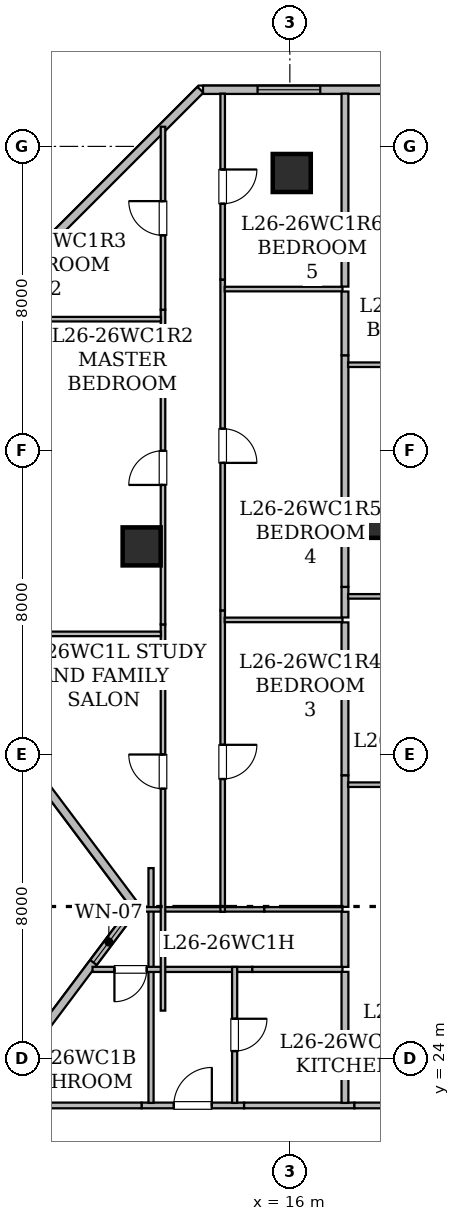
"""IFC4 building model, lengths in metres.
Left out: names, types, materials, properties, quantities, classifications, styles, units other than length and angle.
Written with IfcOpenShell. Run it as: python <this file> out.ifc"""

import sys

from ifc_helpers import new_model, si_unit, direction, frame, frame_2d, origin, origin_2d, place, context, subcontext, project, spatial, rectangle, hollow_rectangle, extrude, element, fill, save


model = new_model("IFC4")
c1 = context("Model", 3, precision=1e-05, world=origin(), true_north=direction((0.0, 1.0)))
c2 = subcontext(c1, "Body", "Model", "MODEL_VIEW")
j1 = project(units=[si_unit("LENGTHUNIT", "METRE"), si_unit("PLANEANGLEUNIT", "RADIAN")], contexts=[c1])
p1 = place(None, origin())
s1 = spatial("IfcSite", under=j1, at=p1, CompositionType="ELEMENT")
p2 = place(p1, origin())
s2 = spatial("IfcBuilding", under=s1, at=p2, CompositionType="ELEMENT")
p3 = place(p2, frame((0.0, 0.0, 105.55)))
s3 = spatial("IfcBuildingStorey", under=s2, at=p3, CompositionType="ELEMENT", Elevation=105.55)
for number, where, z_axis, x_axis in (
    (1, (16.05, 47.3, 0.0), (0.0, 0.0, 1.0), (1.0, 0.0, 0.0)),
    (2, (12.1, 37.475, 0.0), (0.0, 0.0, 1.0), (1.0, 0.0, 0.0)),
    (3, (18.0, 38.2, 0.0), (0.0, 0.0, 1.0), (1.0, 0.0, 0.0)),
):
    element("IfcColumn", number, at=place(p3, frame(where, z_axis=z_axis, x_axis=x_axis)), inside=s3, PredefinedType="COLUMN", context=c2, shape_type="SweptSolid", body=[
        extrude(hollow_rectangle(XDim=1.0, YDim=1.0, WallThickness=0.05, at=origin_2d()), origin(), (0.0, 0.0, 1.0), 3.65),
    ])
p4 = place(p3, frame((9.544, 24.808, 0.0), z_axis=(0.0, 0.0, 1.0), x_axis=(0.600019580308, 0.799985314394, 0.0)))
e4 = element("IfcWall", 4, at=p4, inside=s3, PredefinedType="STANDARD", context=c2, shape_type="SweptSolid", body=[
    extrude(rectangle(XDim=3.99, YDim=0.22, at=frame_2d((1.995, 0.0))), origin(), (0.0, 0.0, 1.0), 3.43),
])
p5 = place(p4, frame((2.147, 0.0, 0.85)))
e5 = element("IfcOpeningElement", 5, at=p5, cuts=e4, PredefinedType="OPENING", context=c2, shape_type="SweptSolid", body=[
    extrude(rectangle(XDim=1.35, YDim=1.5, at=frame_2d((0.675, 0.75))), frame((0.0, 0.12, 0.0), z_axis=(0.0, -1.0, 0.0), x_axis=(1.0, 0.0, 0.0)), (0.0, 0.0, 1.0), 0.24),
])
p6 = place(p3, frame((11.881, 28.077, 0.0), z_axis=(0.0, 0.0, 1.0), x_axis=(-0.600158184825, 0.799881336942, 0.0)))
e6 = element("IfcWall", 6, at=p6, inside=s3, PredefinedType="STANDARD", context=c2, shape_type="SweptSolid", body=[
    extrude(rectangle(XDim=3.951, YDim=0.22, at=frame_2d((1.975, 0.0))), origin(), (0.0, 0.0, 1.0), 3.43),
])
p7 = place(p3, frame((9.558, 45.402, 0.0), z_axis=(0.0, 0.0, 1.0), x_axis=(0.707106781187, 0.707106781187, 0.0)))
e7 = element("IfcWall", 7, at=p7, inside=s3, PredefinedType="STANDARD", context=c2, shape_type="SweptSolid", body=[
    extrude(rectangle(XDim=5.781, YDim=0.22, at=frame_2d((2.891, 0.0))), origin(), (0.0, 0.0, 1.0), 3.43),
])
p8 = place(p3, frame((13.715, 49.49, 0.0), z_axis=(0.0, 0.0, 1.0), x_axis=(1.0, 0.0, 0.0)))
e8 = element("IfcWall", 8, at=p8, inside=s3, PredefinedType="STANDARD", context=c2, shape_type="SweptSolid", body=[
    extrude(rectangle(XDim=38.639, YDim=0.22, at=frame_2d((19.319, 0.0))), origin(), (0.0, 0.0, 1.0), 3.43),
])
p9 = place(p8, frame((1.435, 0.0, 0.85)))
e9 = element("IfcOpeningElement", 9, at=p9, cuts=e8, PredefinedType="OPENING", context=c2, shape_type="SweptSolid", body=[
    extrude(rectangle(XDim=1.65, YDim=1.55, at=frame_2d((0.825, 0.775))), frame((0.0, 0.12, 0.0), z_axis=(0.0, -1.0, 0.0), x_axis=(1.0, 0.0, 0.0)), (0.0, 0.0, 1.0), 0.24),
])
p10 = place(p8, frame((10.802, 0.0, 0.85)))
e10 = element("IfcOpeningElement", 10, at=p10, cuts=e8, PredefinedType="OPENING", context=c2, shape_type="SweptSolid", body=[
    extrude(rectangle(XDim=1.65, YDim=1.55, at=frame_2d((0.825, 0.775))), frame((0.0, 0.12, 0.0), z_axis=(0.0, -1.0, 0.0), x_axis=(1.0, 0.0, 0.0)), (0.0, 0.0, 1.0), 0.24),
])
p11 = place(p8, frame((8.744, 0.0, 0.8)))
e11 = element("IfcOpeningElement", 11, at=p11, cuts=e8, PredefinedType="OPENING", context=c2, shape_type="SweptSolid", body=[
    extrude(rectangle(XDim=1.2, YDim=1.5, at=frame_2d((0.6, 0.75))), frame((0.0, 0.12, 0.0), z_axis=(0.0, -1.0, 0.0), x_axis=(1.0, 0.0, 0.0)), (0.0, 0.0, 1.0), 0.24),
])
p12 = place(p8, frame((5.319, 0.0, 0.85)))
e12 = element("IfcOpeningElement", 12, at=p12, cuts=e8, PredefinedType="OPENING", context=c2, shape_type="SweptSolid", body=[
    extrude(rectangle(XDim=1.65, YDim=1.55, at=frame_2d((0.825, 0.775))), frame((0.0, 0.12, 0.0), z_axis=(0.0, -1.0, 0.0), x_axis=(1.0, 0.0, 0.0)), (0.0, 0.0, 1.0), 0.24),
])
p13 = place(p8, frame((15.665, 0.0, 0.85)))
e13 = element("IfcOpeningElement", 13, at=p13, cuts=e8, PredefinedType="OPENING", context=c2, shape_type="SweptSolid", body=[
    extrude(rectangle(XDim=1.65, YDim=1.55, at=frame_2d((0.825, 0.775))), frame((0.0, 0.12, 0.0), z_axis=(0.0, -1.0, 0.0), x_axis=(1.0, 0.0, 0.0)), (0.0, 0.0, 1.0), 0.24),
])
p14 = place(p8, frame((22.93, 0.0, 0.85)))
e14 = element("IfcOpeningElement", 14, at=p14, cuts=e8, PredefinedType="OPENING", context=c2, shape_type="SweptSolid", body=[
    extrude(rectangle(XDim=1.65, YDim=1.55, at=frame_2d((0.825, 0.775))), frame((0.0, 0.12, 0.0), z_axis=(0.0, -1.0, 0.0), x_axis=(1.0, 0.0, 0.0)), (0.0, 0.0, 1.0), 0.24),
])
p15 = place(p8, frame((30.23, 0.0, 0.85)))
e15 = element("IfcOpeningElement", 15, at=p15, cuts=e8, PredefinedType="OPENING", context=c2, shape_type="SweptSolid", body=[
    extrude(rectangle(XDim=1.65, YDim=1.55, at=frame_2d((0.825, 0.775))), frame((0.0, 0.12, 0.0), z_axis=(0.0, -1.0, 0.0), x_axis=(1.0, 0.0, 0.0)), (0.0, 0.0, 1.0), 0.24),
])
p16 = place(p8, frame((36.367, 0.0, 0.85)))
e16 = element("IfcOpeningElement", 16, at=p16, cuts=e8, PredefinedType="OPENING", context=c2, shape_type="SweptSolid", body=[
    extrude(rectangle(XDim=1.65, YDim=1.55, at=frame_2d((0.825, 0.775))), frame((0.0, 0.12, 0.0), z_axis=(0.0, -1.0, 0.0), x_axis=(1.0, 0.0, 0.0)), (0.0, 0.0, 1.0), 0.24),
])
p17 = place(p3, frame((12.098, 22.765, 0.0), z_axis=(0.0, 0.0, 1.0), x_axis=(1.0, 0.0, 0.0)))
e17 = element("IfcWall", 17, at=p17, inside=s3, PredefinedType="STANDARD", context=c2, shape_type="SweptSolid", body=[
    extrude(rectangle(XDim=2.698, YDim=0.15, at=frame_2d((1.349, 0.0))), origin(), (0.0, 0.0, 1.0), 2.876),
])
p18 = place(p17, frame((0.849, 0.0, 0.0)))
e18 = element("IfcOpeningElement", 18, at=p18, cuts=e17, PredefinedType="OPENING", context=c2, shape_type="SweptSolid", body=[
    extrude(rectangle(XDim=1.0, YDim=2.15, at=frame_2d((0.5, 1.075))), frame((0.0, 0.085, 0.0), z_axis=(0.0, -1.0, 0.0), x_axis=(1.0, 0.0, 0.0)), (0.0, 0.0, 1.0), 0.17),
])
p19 = place(p3, frame((9.612, 22.765, 0.0), z_axis=(0.0, 0.0, 1.0), x_axis=(1.0, 0.0, 0.0)))
e19 = element("IfcWall", 19, at=p19, inside=s3, PredefinedType="STANDARD", context=c2, shape_type="SweptSolid", body=[
    extrude(rectangle(XDim=2.486, YDim=0.15, at=frame_2d((1.243, 0.0))), origin(), (0.0, 0.0, 1.0), 2.876),
])
p20 = place(p3, frame((14.796, 22.765, 0.0), z_axis=(0.0, 0.0, 1.0), x_axis=(1.0, 0.0, 0.0)))
e20 = element("IfcWall", 20, at=p20, inside=s3, PredefinedType="STANDARD", context=c2, shape_type="SweptSolid", body=[
    extrude(rectangle(XDim=2.903, YDim=0.15, at=frame_2d((1.452, 0.0))), origin(), (0.0, 0.0, 1.0), 3.43),
])
p21 = place(p3, frame((17.699, 22.765, 0.0), z_axis=(0.0, 0.0, 1.0), x_axis=(1.0, 0.0, 0.0)))
e21 = element("IfcWall", 21, at=p21, inside=s3, PredefinedType="STANDARD", context=c2, shape_type="SweptSolid", body=[
    extrude(rectangle(XDim=4.321, YDim=0.15, at=frame_2d((2.161, 0.0))), origin(), (0.0, 0.0, 1.0), 2.647),
])
p22 = place(p3, frame((12.347, 22.832, 0.0), z_axis=(0.0, 0.0, 1.0), x_axis=(0.0, 1.0, 0.0)))
e22 = element("IfcWall", 22, at=p22, inside=s3, PredefinedType="PARTITIONING", context=c2, shape_type="SweptSolid", body=[
    extrude(rectangle(XDim=6.178, YDim=0.135, at=frame_2d((3.089, 0.0))), origin(), (0.0, 0.0, 1.0), 2.876),
])
p23 = place(p3, frame((15.012, 26.345, 0.0), z_axis=(0.0, 0.0, 1.0), x_axis=(-1.0, 0.0, 0.0)))
e23 = element("IfcWall", 23, at=p23, inside=s3, PredefinedType="PARTITIONING", context=c2, shape_type="SweptSolid", body=[
    extrude(rectangle(XDim=4.204, YDim=0.135, at=frame_2d((2.102, 0.0))), origin(), (0.0, 0.0, 1.0), 2.876),
])
p24 = place(p23, frame((2.778, 0.0, 0.0)))
e24 = element("IfcOpeningElement", 24, at=p24, cuts=e23, PredefinedType="OPENING", context=c2, shape_type="SweptSolid", body=[
    extrude(rectangle(XDim=0.85, YDim=2.1, at=frame_2d((0.425, 1.05))), frame((0.0, 0.077, 0.0), z_axis=(0.0, -1.0, 0.0), x_axis=(1.0, 0.0, 0.0)), (0.0, 0.0, 1.0), 0.155),
])
p25 = place(p3, frame((17.385, 26.345, 0.0), z_axis=(0.0, 0.0, 1.0), x_axis=(-1.0, 0.0, 0.0)))
e25 = element("IfcWall", 25, at=p25, inside=s3, PredefinedType="PARTITIONING", context=c2, shape_type="SweptSolid", body=[
    extrude(rectangle(XDim=2.373, YDim=0.135, at=frame_2d((1.187, 0.0))), origin(), (0.0, 0.0, 1.0), 3.43),
])
p26 = place(p3, frame((14.547, 26.41, 0.0), z_axis=(0.0, 0.0, 1.0), x_axis=(0.0, -1.0, 0.0)))
e26 = element("IfcWall", 26, at=p26, inside=s3, PredefinedType="PARTITIONING", context=c2, shape_type="SweptSolid", body=[
    extrude(rectangle(XDim=3.578, YDim=0.135, at=frame_2d((1.789, 0.0))), origin(), (0.0, 0.0, 1.0), 3.43),
])
p27 = place(p26, frame((1.364, 0.0, 0.0)))
e27 = element("IfcOpeningElement", 27, at=p27, cuts=e26, PredefinedType="OPENING", context=c2, shape_type="SweptSolid", body=[
    extrude(rectangle(XDim=0.85, YDim=2.1, at=frame_2d((0.425, 1.05))), frame((0.0, 0.077, 0.0), z_axis=(0.0, -1.0, 0.0), x_axis=(1.0, 0.0, 0.0)), (0.0, 0.0, 1.0), 0.155),
])
p28 = place(p3, frame((11.894, 27.925, 0.0), z_axis=(0.0, 0.0, 1.0), x_axis=(1.0, 0.0, 0.0)))
e28 = element("IfcWall", 28, at=p28, inside=s3, PredefinedType="PARTITIONING", context=c2, shape_type="SweptSolid", body=[
    extrude(rectangle(XDim=3.433, YDim=0.12, at=frame_2d((1.716, 0.0))), origin(), (0.0, 0.0, 1.0), 2.876),
])
p29 = place(p3, frame((12.662, 25.26, 0.0), z_axis=(0.0, 0.0, 1.0), x_axis=(0.0, 1.0, 0.0)))
e29 = element("IfcWall", 29, at=p29, inside=s3, PredefinedType="PARTITIONING", context=c2, shape_type="SweptSolid", body=[
    extrude(rectangle(XDim=10.162, YDim=0.12, at=frame_2d((5.081, 0.0))), origin(), (0.0, 0.0, 1.0), 3.43),
])
p30 = place(p29, frame((5.839, 0.0, 0.0)))
e30 = element("IfcOpeningElement", 30, at=p30, cuts=e29, PredefinedType="OPENING", context=c2, shape_type="SweptSolid", body=[
    extrude(rectangle(XDim=0.9, YDim=2.1, at=frame_2d((0.45, 1.05))), frame((0.0, 0.07, 0.0), z_axis=(0.0, -1.0, 0.0), x_axis=(1.0, 0.0, 0.0)), (0.0, 0.0, 1.0), 0.14),
])
p31 = place(p3, frame((12.662, 35.422, 0.0), z_axis=(0.0, 0.0, 1.0), x_axis=(0.0, 1.0, 0.0)))
e31 = element("IfcWall", 31, at=p31, inside=s3, PredefinedType="PARTITIONING", context=c2, shape_type="SweptSolid", body=[
    extrude(rectangle(XDim=8.281, YDim=0.12, at=frame_2d((4.14, 0.0))), origin(), (0.0, 0.0, 1.0), 2.647),
])
p32 = place(p31, frame((3.67, 0.0, 0.0)))
e32 = element("IfcOpeningElement", 32, at=p32, cuts=e31, PredefinedType="OPENING", context=c2, shape_type="SweptSolid", body=[
    extrude(rectangle(XDim=0.9, YDim=2.1, at=frame_2d((0.45, 1.05))), frame((0.0, 0.07, 0.0), z_axis=(0.0, -1.0, 0.0), x_axis=(1.0, 0.0, 0.0)), (0.0, 0.0, 1.0), 0.14),
])
p33 = place(p3, frame((12.662, 43.703, 0.0), z_axis=(0.0, 0.0, 1.0), x_axis=(0.0, 1.0, 0.0)))
e33 = element("IfcWall", 33, at=p33, inside=s3, PredefinedType="PARTITIONING", context=c2, shape_type="SweptSolid", body=[
    extrude(rectangle(XDim=4.814, YDim=0.12, at=frame_2d((2.407, 0.0))), origin(), (0.0, 0.0, 1.0), 3.43),
])
p34 = place(p33, frame((1.957, 0.0, 0.0)))
e34 = element("IfcOpeningElement", 34, at=p34, cuts=e33, PredefinedType="OPENING", context=c2, shape_type="SweptSolid", body=[
    extrude(rectangle(XDim=0.9, YDim=2.1, at=frame_2d((0.45, 1.05))), frame((0.0, 0.07, 0.0), z_axis=(0.0, -1.0, 0.0), x_axis=(1.0, 0.0, 0.0)), (0.0, 0.0, 1.0), 0.14),
])
p35 = place(p3, frame((15.327, 27.925, 0.0), z_axis=(0.0, 0.0, 1.0), x_axis=(1.0, 0.0, 0.0)))
e35 = element("IfcWall", 35, at=p35, inside=s3, PredefinedType="PARTITIONING", context=c2, shape_type="SweptSolid", body=[
    extrude(rectangle(XDim=2.058, YDim=0.12, at=frame_2d((1.029, 0.0))), origin(), (0.0, 0.0, 1.0), 3.43),
])
p36 = place(p3, frame((14.232, 35.79, 0.0), z_axis=(0.0, 0.0, 1.0), x_axis=(0.0, -1.0, 0.0)))
e36 = element("IfcWall", 36, at=p36, inside=s3, PredefinedType="PARTITIONING", context=c2, shape_type="SweptSolid", body=[
    extrude(rectangle(XDim=7.93, YDim=0.12, at=frame_2d((3.965, 0.0))), origin(), (0.0, 0.0, 1.0), 3.43),
])
p37 = place(p36, frame((3.536, 0.0, 0.0)))
e37 = element("IfcOpeningElement", 37, at=p37, cuts=e36, PredefinedType="OPENING", context=c2, shape_type="SweptSolid", body=[
    extrude(rectangle(XDim=0.9, YDim=2.1, at=frame_2d((0.45, 1.05))), frame((0.0, 0.07, 0.0), z_axis=(0.0, -1.0, 0.0), x_axis=(1.0, 0.0, 0.0)), (0.0, 0.0, 1.0), 0.14),
])
p38 = place(p3, frame((14.232, 44.495, 0.0), z_axis=(0.0, 0.0, 1.0), x_axis=(0.0, -1.0, 0.0)))
e38 = element("IfcWall", 38, at=p38, inside=s3, PredefinedType="PARTITIONING", context=c2, shape_type="SweptSolid", body=[
    extrude(rectangle(XDim=8.705, YDim=0.12, at=frame_2d((4.353, 0.0))), origin(), (0.0, 0.0, 1.0), 2.647),
])
p39 = place(p38, frame((3.923, 0.0, 0.0)))
e39 = element("IfcOpeningElement", 39, at=p39, cuts=e38, PredefinedType="OPENING", context=c2, shape_type="SweptSolid", body=[
    extrude(rectangle(XDim=0.9, YDim=2.1, at=frame_2d((0.45, 1.05))), frame((0.0, 0.07, 0.0), z_axis=(0.0, -1.0, 0.0), x_axis=(1.0, 0.0, 0.0)), (0.0, 0.0, 1.0), 0.14),
])
p40 = place(p3, frame((14.232, 49.388, 0.0), z_axis=(0.0, 0.0, 1.0), x_axis=(0.0, -1.0, 0.0)))
e40 = element("IfcWall", 40, at=p40, inside=s3, PredefinedType="PARTITIONING", context=c2, shape_type="SweptSolid", body=[
    extrude(rectangle(XDim=4.893, YDim=0.12, at=frame_2d((2.446, 0.0))), origin(), (0.0, 0.0, 1.0), 3.43),
])
p41 = place(p40, frame((1.996, 0.0, 0.0)))
e41 = element("IfcOpeningElement", 41, at=p41, cuts=e40, PredefinedType="OPENING", context=c2, shape_type="SweptSolid", body=[
    extrude(rectangle(XDim=0.9, YDim=2.1, at=frame_2d((0.45, 1.05))), frame((0.0, 0.07, 0.0), z_axis=(0.0, -1.0, 0.0), x_axis=(1.0, 0.0, 0.0)), (0.0, 0.0, 1.0), 0.14),
])
p42 = place(p3, frame((17.45, 27.86, 0.0), z_axis=(0.0, 0.0, 1.0), x_axis=(0.0, -1.0, 0.0)))
e42 = element("IfcWall", 42, at=p42, inside=s3, PredefinedType="STANDARD", context=c2, shape_type="SweptSolid", body=[
    extrude(rectangle(XDim=1.45, YDim=0.18, at=frame_2d((0.725, 0.0))), origin(), (0.0, 0.0, 1.0), 3.43),
])
p43 = place(p3, frame((17.45, 26.28, 0.0), z_axis=(0.0, 0.0, 1.0), x_axis=(0.0, -1.0, 0.0)))
e43 = element("IfcWall", 43, at=p43, inside=s3, PredefinedType="STANDARD", context=c2, shape_type="SweptSolid", body=[
    extrude(rectangle(XDim=3.448, YDim=0.18, at=frame_2d((1.724, 0.0))), origin(), (0.0, 0.0, 1.0), 3.43),
])
p44 = place(p3, frame((9.612, 35.173, 0.0), z_axis=(0.0, 0.0, 1.0), x_axis=(1.0, 0.0, 0.0)))
e44 = element("IfcWall", 44, at=p44, inside=s3, PredefinedType="PARTITIONING", context=c2, shape_type="SweptSolid", body=[
    extrude(rectangle(XDim=2.996, YDim=0.12, at=frame_2d((1.498, 0.0))), origin(), (0.0, 0.0, 1.0), 2.876),
])
p45 = place(p3, frame((9.612, 43.454, 0.0), z_axis=(0.0, 0.0, 1.0), x_axis=(1.0, 0.0, 0.0)))
e45 = element("IfcWall", 45, at=p45, inside=s3, PredefinedType="PARTITIONING", context=c2, shape_type="SweptSolid", body=[
    extrude(rectangle(XDim=2.996, YDim=0.12, at=frame_2d((1.498, 0.0))), origin(), (0.0, 0.0, 1.0), 3.43),
])
p46 = place(p3, frame((14.286, 35.541, 0.0), z_axis=(0.0, 0.0, 1.0), x_axis=(1.0, 0.0, 0.0)))
e46 = element("IfcWall", 46, at=p46, inside=s3, PredefinedType="PARTITIONING", context=c2, shape_type="SweptSolid", body=[
    extrude(rectangle(XDim=3.099, YDim=0.12, at=frame_2d((1.55, 0.0))), origin(), (0.0, 0.0, 1.0), 3.43),
])
p47 = place(p3, frame((17.45, 31.454, 0.0), z_axis=(0.0, 0.0, 1.0), x_axis=(0.0, -1.0, 0.0)))
e47 = element("IfcWall", 47, at=p47, inside=s3, PredefinedType="STANDARD", context=c2, shape_type="SweptSolid", body=[
    extrude(rectangle(XDim=3.464, YDim=0.18, at=frame_2d((1.732, 0.0))), origin(), (0.0, 0.0, 1.0), 3.43),
])
p48 = place(p3, frame((17.45, 35.476, 0.0), z_axis=(0.0, 0.0, 1.0), x_axis=(0.0, -1.0, 0.0)))
e48 = element("IfcWall", 48, at=p48, inside=s3, PredefinedType="STANDARD", context=c2, shape_type="SweptSolid", body=[
    extrude(rectangle(XDim=4.022, YDim=0.18, at=frame_2d((2.011, 0.0))), origin(), (0.0, 0.0, 1.0), 3.43),
])
p49 = place(p3, frame((14.286, 44.246, 0.0), z_axis=(0.0, 0.0, 1.0), x_axis=(1.0, 0.0, 0.0)))
e49 = element("IfcWall", 49, at=p49, inside=s3, PredefinedType="PARTITIONING", context=c2, shape_type="SweptSolid", body=[
    extrude(rectangle(XDim=3.099, YDim=0.12, at=frame_2d((1.55, 0.0))), origin(), (0.0, 0.0, 1.0), 2.647),
])
p50 = place(p3, frame((17.45, 36.409, 0.0), z_axis=(0.0, 0.0, 1.0), x_axis=(0.0, -1.0, 0.0)))
e50 = element("IfcWall", 50, at=p50, inside=s3, PredefinedType="STANDARD", context=c2, shape_type="SweptSolid", body=[
    extrude(rectangle(XDim=0.803, YDim=0.18, at=frame_2d((0.401, 0.0))), origin(), (0.0, 0.0, 1.0), 3.43),
])
p51 = place(p3, frame((17.45, 42.504, 0.0), z_axis=(0.0, 0.0, 1.0), x_axis=(0.0, -1.0, 0.0)))
e51 = element("IfcWall", 51, at=p51, inside=s3, PredefinedType="STANDARD", context=c2, shape_type="SweptSolid", body=[
    extrude(rectangle(XDim=6.095, YDim=0.18, at=frame_2d((3.047, 0.0))), origin(), (0.0, 0.0, 1.0), 2.647),
])
p52 = place(p3, frame((17.45, 44.181, 0.0), z_axis=(0.0, 0.0, 1.0), x_axis=(0.0, -1.0, 0.0)))
e52 = element("IfcWall", 52, at=p52, inside=s3, PredefinedType="STANDARD", context=c2, shape_type="SweptSolid", body=[
    extrude(rectangle(XDim=1.677, YDim=0.18, at=frame_2d((0.838, 0.0))), origin(), (0.0, 0.0, 1.0), 2.647),
])
p53 = place(p3, frame((17.45, 49.388, 0.0), z_axis=(0.0, 0.0, 1.0), x_axis=(0.0, -1.0, 0.0)))
e53 = element("IfcWall", 53, at=p53, inside=s3, PredefinedType="STANDARD", context=c2, shape_type="SweptSolid", body=[
    extrude(rectangle(XDim=5.077, YDim=0.18, at=frame_2d((2.539, 0.0))), origin(), (0.0, 0.0, 1.0), 2.876),
])
for number, where, z_axis, x_axis in (
    (54, (17.532, 31.205, 0.0), (0.0, 0.0, 1.0), (1.0, 0.0, 0.0)),
    (55, (17.532, 36.16, 0.0), (0.0, 0.0, 1.0), (1.0, 0.0, 0.0)),
):
    element("IfcWall", number, at=place(p3, frame(where, z_axis=z_axis, x_axis=x_axis)), inside=s3, PredefinedType="PARTITIONING", context=c2, shape_type="SweptSolid", body=[
        extrude(rectangle(XDim=4.683, YDim=0.12, at=frame_2d((2.342, 0.0))), origin(), (0.0, 0.0, 1.0), 2.647),
    ])
p54 = place(p3, frame((17.532, 42.255, 0.0), z_axis=(0.0, 0.0, 1.0), x_axis=(1.0, 0.0, 0.0)))
e56 = element("IfcWall", 56, at=p54, inside=s3, PredefinedType="PARTITIONING", context=c2, shape_type="SweptSolid", body=[
    extrude(rectangle(XDim=4.683, YDim=0.12, at=frame_2d((2.342, 0.0))), origin(), (0.0, 0.0, 1.0), 3.43),
])
p55 = place(p5, origin())
e57 = element("IfcWindow", 57, at=p55, inside=s3, PartitioningType="SINGLE_PANEL", PredefinedType="WINDOW", context=c2, shape_type="SweptSolid", body=[
    extrude(rectangle(XDim=1.35, YDim=1.5, at=frame_2d((0.675, 0.75))), frame((0.0, 0.03, 0.0), z_axis=(0.0, -1.0, 0.0), x_axis=(1.0, 0.0, 0.0)), (0.0, 0.0, 1.0), 0.06),
])
fill(e5, e57)
p56 = place(p9, origin())
e58 = element("IfcWindow", 58, at=p56, inside=s3, PartitioningType="SINGLE_PANEL", PredefinedType="WINDOW", context=c2, shape_type="SweptSolid", body=[
    extrude(rectangle(XDim=1.65, YDim=1.55, at=frame_2d((0.825, 0.775))), frame((0.0, 0.03, 0.0), z_axis=(0.0, -1.0, 0.0), x_axis=(1.0, 0.0, 0.0)), (0.0, 0.0, 1.0), 0.06),
])
fill(e9, e58)
p57 = place(p18, origin())
e59 = element("IfcDoor", 59, at=p57, inside=s3, OperationType="SINGLE_SWING_RIGHT", PredefinedType="DOOR", context=c2, shape_type="SweptSolid", body=[
    extrude(rectangle(XDim=1.0, YDim=2.15, at=frame_2d((0.5, 1.075))), frame((0.0, 0.025, 0.0), z_axis=(0.0, -1.0, 0.0), x_axis=(1.0, 0.0, 0.0)), (0.0, 0.0, 1.0), 0.05),
])
fill(e18, e59)
p58 = place(p24, origin())
e60 = element("IfcDoor", 60, at=p58, inside=s3, OperationType="SINGLE_SWING_RIGHT", PredefinedType="DOOR", context=c2, shape_type="SweptSolid", body=[
    extrude(rectangle(XDim=0.85, YDim=2.1, at=frame_2d((0.425, 1.05))), frame((0.0, 0.025, 0.0), z_axis=(0.0, -1.0, 0.0), x_axis=(1.0, 0.0, 0.0)), (0.0, 0.0, 1.0), 0.05),
])
fill(e24, e60)
p59 = place(p27, origin())
e61 = element("IfcDoor", 61, at=p59, inside=s3, OperationType="SINGLE_SWING_LEFT", PredefinedType="DOOR", context=c2, shape_type="SweptSolid", body=[
    extrude(rectangle(XDim=0.85, YDim=2.1, at=frame_2d((0.425, 1.05))), frame((0.0, 0.025, 0.0), z_axis=(0.0, -1.0, 0.0), x_axis=(1.0, 0.0, 0.0)), (0.0, 0.0, 1.0), 0.05),
])
fill(e27, e61)
p60 = place(p30, origin())
e62 = element("IfcDoor", 62, at=p60, inside=s3, OperationType="SINGLE_SWING_RIGHT", PredefinedType="DOOR", context=c2, shape_type="SweptSolid", body=[
    extrude(rectangle(XDim=0.9, YDim=2.1, at=frame_2d((0.45, 1.05))), frame((0.0, 0.025, 0.0), z_axis=(0.0, -1.0, 0.0), x_axis=(1.0, 0.0, 0.0)), (0.0, 0.0, 1.0), 0.05),
])
fill(e30, e62)
p61 = place(p32, origin())
e63 = element("IfcDoor", 63, at=p61, inside=s3, OperationType="SINGLE_SWING_LEFT", PredefinedType="DOOR", context=c2, shape_type="SweptSolid", body=[
    extrude(rectangle(XDim=0.9, YDim=2.1, at=frame_2d((0.45, 1.05))), frame((0.0, 0.025, 0.0), z_axis=(0.0, -1.0, 0.0), x_axis=(1.0, 0.0, 0.0)), (0.0, 0.0, 1.0), 0.05),
])
fill(e32, e63)
p62 = place(p34, origin())
e64 = element("IfcDoor", 64, at=p62, inside=s3, OperationType="SINGLE_SWING_RIGHT", PredefinedType="DOOR", context=c2, shape_type="SweptSolid", body=[
    extrude(rectangle(XDim=0.9, YDim=2.1, at=frame_2d((0.45, 1.05))), frame((0.0, 0.025, 0.0), z_axis=(0.0, -1.0, 0.0), x_axis=(1.0, 0.0, 0.0)), (0.0, 0.0, 1.0), 0.05),
])
fill(e34, e64)
p63 = place(p37, origin())
e65 = element("IfcDoor", 65, at=p63, inside=s3, OperationType="SINGLE_SWING_LEFT", PredefinedType="DOOR", context=c2, shape_type="SweptSolid", body=[
    extrude(rectangle(XDim=0.9, YDim=2.1, at=frame_2d((0.45, 1.05))), frame((0.0, 0.025, 0.0), z_axis=(0.0, -1.0, 0.0), x_axis=(1.0, 0.0, 0.0)), (0.0, 0.0, 1.0), 0.05),
])
fill(e37, e65)
p64 = place(p39, origin())
e66 = element("IfcDoor", 66, at=p64, inside=s3, OperationType="SINGLE_SWING_RIGHT", PredefinedType="DOOR", context=c2, shape_type="SweptSolid", body=[
    extrude(rectangle(XDim=0.9, YDim=2.1, at=frame_2d((0.45, 1.05))), frame((0.0, 0.025, 0.0), z_axis=(0.0, -1.0, 0.0), x_axis=(1.0, 0.0, 0.0)), (0.0, 0.0, 1.0), 0.05),
])
fill(e39, e66)
p65 = place(p41, origin())
e67 = element("IfcDoor", 67, at=p65, inside=s3, OperationType="SINGLE_SWING_LEFT", PredefinedType="DOOR", context=c2, shape_type="SweptSolid", body=[
    extrude(rectangle(XDim=0.9, YDim=2.1, at=frame_2d((0.45, 1.05))), frame((0.0, 0.025, 0.0), z_axis=(0.0, -1.0, 0.0), x_axis=(1.0, 0.0, 0.0)), (0.0, 0.0, 1.0), 0.05),
])
fill(e41, e67)
save(model, sys.argv[1])
